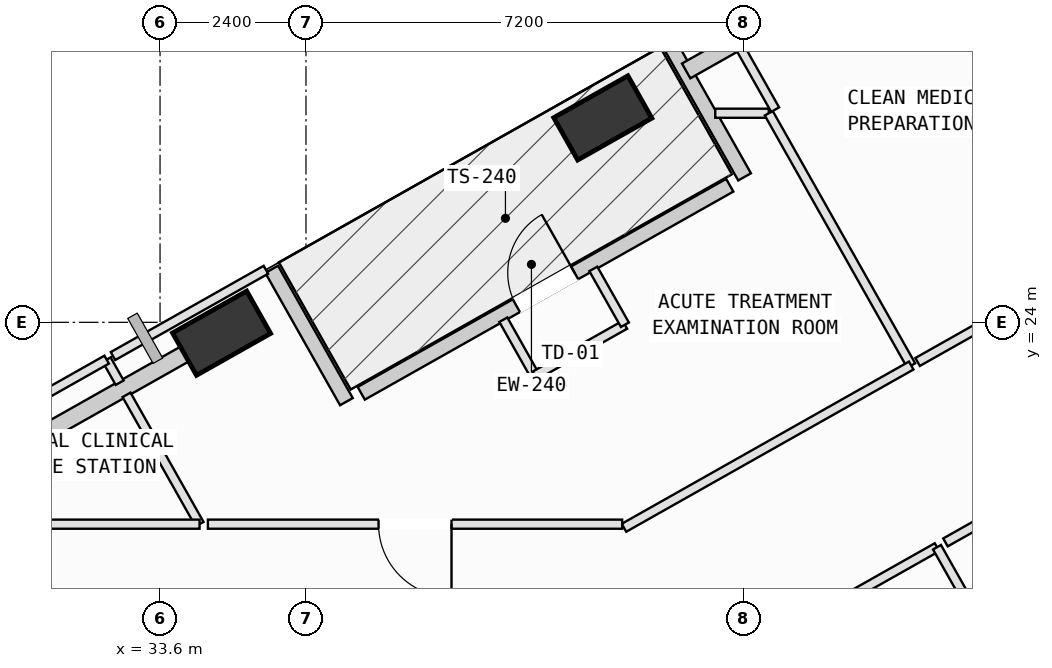
"""IFC4 building model, lengths in metres.
Left out: names, types, materials, properties, quantities, classifications, styles, units other than length and angle.
Written with IfcOpenShell. Run it as: python <this file> out.ifc"""

import sys

from ifc_helpers import new_model, si_unit, direction, frame, frame_2d, origin, origin_2d, place, context, subcontext, project, spatial, rectangle, extrude, element, fill, save


model = new_model("IFC4")
c1 = context("Model", 3, precision=1e-05, world=origin(), true_north=direction((0.0, 1.0)))
c2 = subcontext(c1, "Body", "Model", "MODEL_VIEW")
j1 = project(units=[si_unit("LENGTHUNIT", "METRE"), si_unit("PLANEANGLEUNIT", "RADIAN")], contexts=[c1])
p1 = place(None, origin())
s1 = spatial("IfcSite", under=j1, at=p1, CompositionType="ELEMENT")
p2 = place(p1, origin())
s2 = spatial("IfcBuilding", under=s1, at=p2, CompositionType="ELEMENT")
p3 = place(p2, frame((0.0, 0.0, 149.8)))
s3 = spatial("IfcBuildingStorey", under=s2, at=p3, CompositionType="ELEMENT", Elevation=149.8)
p4 = place(p3, frame((40.881, 27.362, 0.025), z_axis=(-0.01080860271, 0.030092132545, 0.999488688113), x_axis=(-0.653407021081, -0.756843527914, 0.015720657018)))
e1 = element("IfcColumn", 1, at=p4, inside=s3, PredefinedType="COLUMN", context=c2, shape_type="SweptSolid", body=[
    extrude(rectangle(XDim=1.4, YDim=0.8, at=origin_2d()), origin(), (0.0, 0.0, 1.0), 3.975),
])
p5 = place(p3, frame((34.612, 23.821, 0.007), z_axis=(0.004036875309, 0.004220369641, 0.999982945913), x_axis=(-0.969109138481, 0.246615556484, 0.002871412915)))
e2 = element("IfcColumn", 2, at=p5, inside=s3, PredefinedType="COLUMN", context=c2, shape_type="SweptSolid", body=[
    extrude(rectangle(XDim=1.4, YDim=0.8, at=origin_2d()), origin(), (0.0, 0.0, 1.0), 3.991),
])
p6 = place(p3, frame((36.909, 22.833, 0.0), z_axis=(0.0, 0.0, 1.0), x_axis=(0.870780952781, 0.491671162744, 0.0)))
e3 = element("IfcWall", 3, at=p6, inside=s3, PredefinedType="SOLIDWALL", context=c2, shape_type="SweptSolid", body=[
    extrude(rectangle(XDim=6.96, YDim=0.24, at=frame_2d((3.48, 0.0))), origin(), (0.0, 0.0, 1.0), 3.165),
])
p7 = place(p6, frame((2.93, 0.0, 0.0)))
e4 = element("IfcOpeningElement", 4, at=p7, cuts=e3, PredefinedType="OPENING", context=c2, shape_type="SweptSolid", body=[
    extrude(rectangle(XDim=1.1, YDim=2.15, at=frame_2d((0.55, 1.075))), frame((0.0, 0.13, 0.0), z_axis=(0.0, -1.0, 0.0), x_axis=(1.0, 0.0, 0.0)), (0.0, 0.0, 1.0), 0.26),
])
for number, where, z_axis, x_axis in (
    (5, (35.436, 24.872, 0.0), (0.0, 0.0, 1.0), (0.492, -0.871, 0.0)),
    (6, (43.213, 26.392, 0.0), (0.0, 0.0, 1.0), (-0.492, 0.871, 0.0)),
):
    element("IfcWall", number, at=place(p3, frame(where, z_axis=z_axis, x_axis=x_axis)), inside=s3, PredefinedType="SOLIDWALL", context=c2, shape_type="SweptSolid", body=[
        extrude(rectangle(XDim=2.5, YDim=0.24, at=frame_2d((1.25, 0.0))), origin(), (0.0, 0.0, 1.0), 3.165),
    ])
p8 = place(p3, frame((42.252, 28.135, 0.0), z_axis=(0.0, 0.0, 1.0), x_axis=(0.8708017473, 0.491634332507, 0.0)))
e7 = element("IfcWall", 7, at=p8, inside=s3, PredefinedType="SOLIDWALL", context=c2, shape_type="SweptSolid", body=[
    extrude(rectangle(XDim=5.156, YDim=0.28, at=frame_2d((2.578, 0.0))), origin(), (0.0, 0.0, 1.0), 3.145),
])
p9 = place(p8, frame((2.26, 0.0, 0.75)))
e8 = element("IfcOpeningElement", 8, at=p9, cuts=e7, PredefinedType="OPENING", context=c2, shape_type="SweptSolid", body=[
    extrude(rectangle(XDim=1.8, YDim=2.05, at=frame_2d((0.9, 1.025))), frame((0.0, 0.15, 0.0), z_axis=(0.0, -1.0, 0.0), x_axis=(1.0, 0.0, 0.0)), (0.0, 0.0, 1.0), 0.3),
])
p10 = place(p3, frame((29.0, 20.652, 0.0), z_axis=(0.0, 0.0, 1.0), x_axis=(0.870797720875, 0.491641464199, 0.0)))
e9 = element("IfcWall", 9, at=p10, inside=s3, PredefinedType="SOLIDWALL", context=c2, shape_type="SweptSolid", body=[
    extrude(rectangle(XDim=5.96, YDim=0.28, at=frame_2d((2.98, 0.0))), origin(), (0.0, 0.0, 1.0), 2.765),
])
p11 = place(p3, frame((39.203, 16.25, 0.0), z_axis=(0.0, 0.0, 1.0), x_axis=(0.870793414879, 0.491649090921, 0.0)))
e10 = element("IfcWall", 10, at=p11, inside=s3, PredefinedType="PARTITIONING", context=c2, shape_type="SweptSolid", body=[
    extrude(rectangle(XDim=8.24, YDim=0.15, at=frame_2d((4.12, 0.0))), origin(), (0.0, 0.0, 1.0), 3.78),
])
p12 = place(p11, frame((3.52, 0.0, 0.0)))
e11 = element("IfcOpeningElement", 11, at=p12, cuts=e10, PredefinedType="OPENING", context=c2, shape_type="SweptSolid", body=[
    extrude(rectangle(XDim=1.2, YDim=2.15, at=frame_2d((0.6, 1.075))), frame((0.0, 0.085, 0.0), z_axis=(0.0, -1.0, 0.0), x_axis=(1.0, 0.0, 0.0)), (0.0, 0.0, 1.0), 0.17),
])
p13 = place(p3, frame((46.378, 20.301, 0.0), z_axis=(0.0, 0.0, 1.0), x_axis=(0.491699953703, -0.870764695844, 0.0)))
e12 = element("IfcWall", 12, at=p13, inside=s3, PredefinedType="PARTITIONING", context=c2, shape_type="SweptSolid", body=[
    extrude(rectangle(XDim=11.934, YDim=0.15, at=frame_2d((5.967, 0.0))), origin(), (0.0, 0.0, 1.0), 3.415),
])
p14 = place(p3, frame((46.517, 20.38, 0.0), z_axis=(0.0, 0.0, 1.0), x_axis=(0.870819350586, 0.491603151581, 0.0)))
e13 = element("IfcWall", 13, at=p14, inside=s3, PredefinedType="PARTITIONING", context=c2, shape_type="SweptSolid", body=[
    extrude(rectangle(XDim=5.439, YDim=0.15, at=frame_2d((2.72, 0.0))), origin(), (0.0, 0.0, 1.0), 2.765),
])
p15 = place(p14, frame((2.12, 0.0, 0.0)))
e14 = element("IfcOpeningElement", 14, at=p15, cuts=e13, PredefinedType="OPENING", context=c2, shape_type="SweptSolid", body=[
    extrude(rectangle(XDim=1.2, YDim=2.15, at=frame_2d((0.6, 1.075))), frame((0.0, 0.085, 0.0), z_axis=(0.0, -1.0, 0.0), x_axis=(1.0, 0.0, 0.0)), (0.0, 0.0, 1.0), 0.17),
])
p16 = place(p3, frame((32.722, 23.386, 0.0), z_axis=(0.0, 0.0, 1.0), x_axis=(0.491964831571, -0.870615072519, 0.0)))
e15 = element("IfcWall", 15, at=p16, inside=s3, PredefinedType="PARTITIONING", context=c2, shape_type="SweptSolid", body=[
    extrude(rectangle(XDim=0.435, YDim=0.15, at=frame_2d((0.218, 0.0))), origin(), (0.0, 0.0, 1.0), 3.78),
])
p17 = place(p3, frame((33.049, 22.807, 0.0), z_axis=(0.0, 0.0, 1.0), x_axis=(0.491665273571, -0.870784277973, 0.0)))
e16 = element("IfcWall", 16, at=p17, inside=s3, PredefinedType="PARTITIONING", context=c2, shape_type="SweptSolid", body=[
    extrude(rectangle(XDim=2.443, YDim=0.15, at=frame_2d((1.221, 0.0))), origin(), (0.0, 0.0, 1.0), 3.78),
])
p18 = place(p3, frame((34.25, 20.68, 0.0), z_axis=(0.0, 0.0, 1.0), x_axis=(-1.0, 0.0, 0.0)))
e17 = element("IfcWall", 17, at=p18, inside=s3, PredefinedType="PARTITIONING", context=c2, shape_type="SweptSolid", body=[
    extrude(rectangle(XDim=3.05, YDim=0.15, at=frame_2d((1.525, 0.0))), origin(), (0.0, 0.0, 1.0), 3.78),
])
p19 = place(p3, frame((28.769, 21.153, 0.0), z_axis=(0.0, 0.0, 1.0), x_axis=(0.870688005498, 0.491835741973, 0.0)))
e18 = element("IfcWall", 18, at=p19, inside=s3, PredefinedType="PARTITIONING", context=c2, shape_type="SweptSolid", body=[
    extrude(rectangle(XDim=4.54, YDim=0.15, at=frame_2d((2.27, 0.0))), origin(), (0.0, 0.0, 1.0), 3.78),
])
p20 = place(p3, frame((32.826, 23.445, 0.0), z_axis=(0.0, 0.0, 1.0), x_axis=(0.870956203304, 0.491360653621, 0.0)))
e19 = element("IfcWall", 19, at=p20, inside=s3, PredefinedType="PARTITIONING", context=c2, shape_type="SweptSolid", body=[
    extrude(rectangle(XDim=2.888, YDim=0.15, at=frame_2d((1.444, 0.0))), origin(), (0.0, 0.0, 1.0), 3.78),
])
p21 = place(p3, frame((39.246, 24.043, 0.0), z_axis=(0.0, 0.0, 1.0), x_axis=(0.490920442926, -0.871204406966, 0.0)))
e20 = element("IfcWall", 20, at=p21, inside=s3, PredefinedType="PARTITIONING", context=c2, shape_type="SweptSolid", body=[
    extrude(rectangle(XDim=1.055, YDim=0.15, at=frame_2d((0.527, 0.0))), origin(), (0.0, 0.0, 1.0), 3.78),
])
p22 = place(p3, frame((39.764, 23.124, 0.0), z_axis=(0.0, 0.0, 1.0), x_axis=(0.870880797737, 0.491494289014, 0.0)))
e21 = element("IfcWall", 21, at=p22, inside=s3, PredefinedType="PARTITIONING", context=c2, shape_type="SweptSolid", body=[
    extrude(rectangle(XDim=1.701, YDim=0.15, at=frame_2d((0.851, 0.0))), origin(), (0.0, 0.0, 1.0), 3.415),
])
p23 = place(p3, frame((41.245, 23.96, 0.0), z_axis=(0.0, 0.0, 1.0), x_axis=(-0.491798070735, 0.870709284217, 0.0)))
e22 = element("IfcWall", 22, at=p23, inside=s3, PredefinedType="PARTITIONING", context=c2, shape_type="SweptSolid", body=[
    extrude(rectangle(XDim=1.055, YDim=0.15, at=frame_2d((0.528, 0.0))), origin(), (0.0, 0.0, 1.0), 3.78),
])
p24 = place(p3, frame((42.731, 27.439, 0.0), z_axis=(0.0, 0.0, 1.0), x_axis=(1.0, 0.0, 0.0)))
e23 = element("IfcWall", 23, at=p24, inside=s3, PredefinedType="PARTITIONING", context=c2, shape_type="SweptSolid", body=[
    extrude(rectangle(XDim=0.88, YDim=0.15, at=frame_2d((0.44, 0.0))), origin(), (0.0, 0.0, 1.0), 3.78),
])
p25 = place(p3, frame((43.611, 27.439, 0.0), z_axis=(0.0, 0.0, 1.0), x_axis=(0.491647001165, -0.87079459475, 0.0)))
e24 = element("IfcWall", 24, at=p25, inside=s3, PredefinedType="PARTITIONING", context=c2, shape_type="SweptSolid", body=[
    extrude(rectangle(XDim=4.766, YDim=0.15, at=frame_2d((2.383, 0.0))), origin(), (0.0, 0.0, 1.0), 3.415),
])
p26 = place(p3, frame((45.954, 23.289, 0.0), z_axis=(0.0, 0.0, 1.0), x_axis=(-0.870735432675, -0.491751773037, 0.0)))
e25 = element("IfcWall", 25, at=p26, inside=s3, PredefinedType="PARTITIONING", context=c2, shape_type="SweptSolid", body=[
    extrude(rectangle(XDim=5.426, YDim=0.15, at=frame_2d((2.713, 0.0))), origin(), (0.0, 0.0, 1.0), 3.78),
])
p27 = place(p3, frame((41.2, 20.68, 0.0), z_axis=(0.0, 0.0, 1.0), x_axis=(-1.0, 0.0, 0.0)))
e26 = element("IfcWall", 26, at=p27, inside=s3, PredefinedType="PARTITIONING", context=c2, shape_type="SweptSolid", body=[
    extrude(rectangle(XDim=6.813, YDim=0.15, at=frame_2d((3.406, 0.0))), origin(), (0.0, 0.0, 1.0), 3.415),
])
p28 = place(p27, frame((2.806, 0.0, 0.0)))
e27 = element("IfcOpeningElement", 27, at=p28, cuts=e26, PredefinedType="OPENING", context=c2, shape_type="SweptSolid", body=[
    extrude(rectangle(XDim=1.2, YDim=2.15, at=frame_2d((0.6, 1.075))), frame((0.0, 0.085, 0.0), z_axis=(0.0, -1.0, 0.0), x_axis=(1.0, 0.0, 0.0)), (0.0, 0.0, 1.0), 0.17),
])
p29 = place(p3, frame((52.42, 26.94, 0.0), z_axis=(0.0, 0.0, 1.0), x_axis=(-0.870751378519, -0.491723536967, 0.0)))
e28 = element("IfcWall", 28, at=p29, inside=s3, PredefinedType="PARTITIONING", context=c2, shape_type="SweptSolid", body=[
    extrude(rectangle(XDim=7.305, YDim=0.15, at=frame_2d((3.652, 0.0))), origin(), (0.0, 0.0, 1.0), 3.78),
])
p30 = place(p29, frame((3.052, 0.0, 0.0)))
e29 = element("IfcOpeningElement", 29, at=p30, cuts=e28, PredefinedType="OPENING", context=c2, shape_type="SweptSolid", body=[
    extrude(rectangle(XDim=1.2, YDim=2.15, at=frame_2d((0.6, 1.075))), frame((0.0, 0.085, 0.0), z_axis=(0.0, -1.0, 0.0), x_axis=(1.0, 0.0, 0.0)), (0.0, 0.0, 1.0), 0.17),
])
p31 = place(p3, frame((43.716, 27.498, 0.0), z_axis=(0.0, 0.0, 1.0), x_axis=(-0.491890651363, 0.870656985903, 0.0)))
e30 = element("IfcWall", 30, at=p31, inside=s3, PredefinedType="PARTITIONING", context=c2, shape_type="SweptSolid", body=[
    extrude(rectangle(XDim=1.159, YDim=0.15, at=frame_2d((0.58, 0.0))), origin(), (0.0, 0.0, 1.0), 3.78),
])
p32 = place(p7, origin())
e31 = element("IfcDoor", 31, at=p32, inside=s3, OperationType="SINGLE_SWING_RIGHT", PredefinedType="DOOR", context=c2, shape_type="SweptSolid", body=[
    extrude(rectangle(XDim=1.1, YDim=2.15, at=frame_2d((0.55, 1.075))), frame((0.0, 0.025, 0.0), z_axis=(0.0, -1.0, 0.0), x_axis=(1.0, 0.0, 0.0)), (0.0, 0.0, 1.0), 0.05),
])
fill(e4, e31)
p33 = place(p28, origin())
e32 = element("IfcDoor", 32, at=p33, inside=s3, OperationType="SINGLE_SWING_LEFT", PredefinedType="DOOR", context=c2, shape_type="SweptSolid", body=[
    extrude(rectangle(XDim=1.2, YDim=2.15, at=frame_2d((0.6, 1.075))), frame((0.0, 0.025, 0.0), z_axis=(0.0, -1.0, 0.0), x_axis=(1.0, 0.0, 0.0)), (0.0, 0.0, 1.0), 0.05),
])
fill(e27, e32)
save(model, sys.argv[1])
